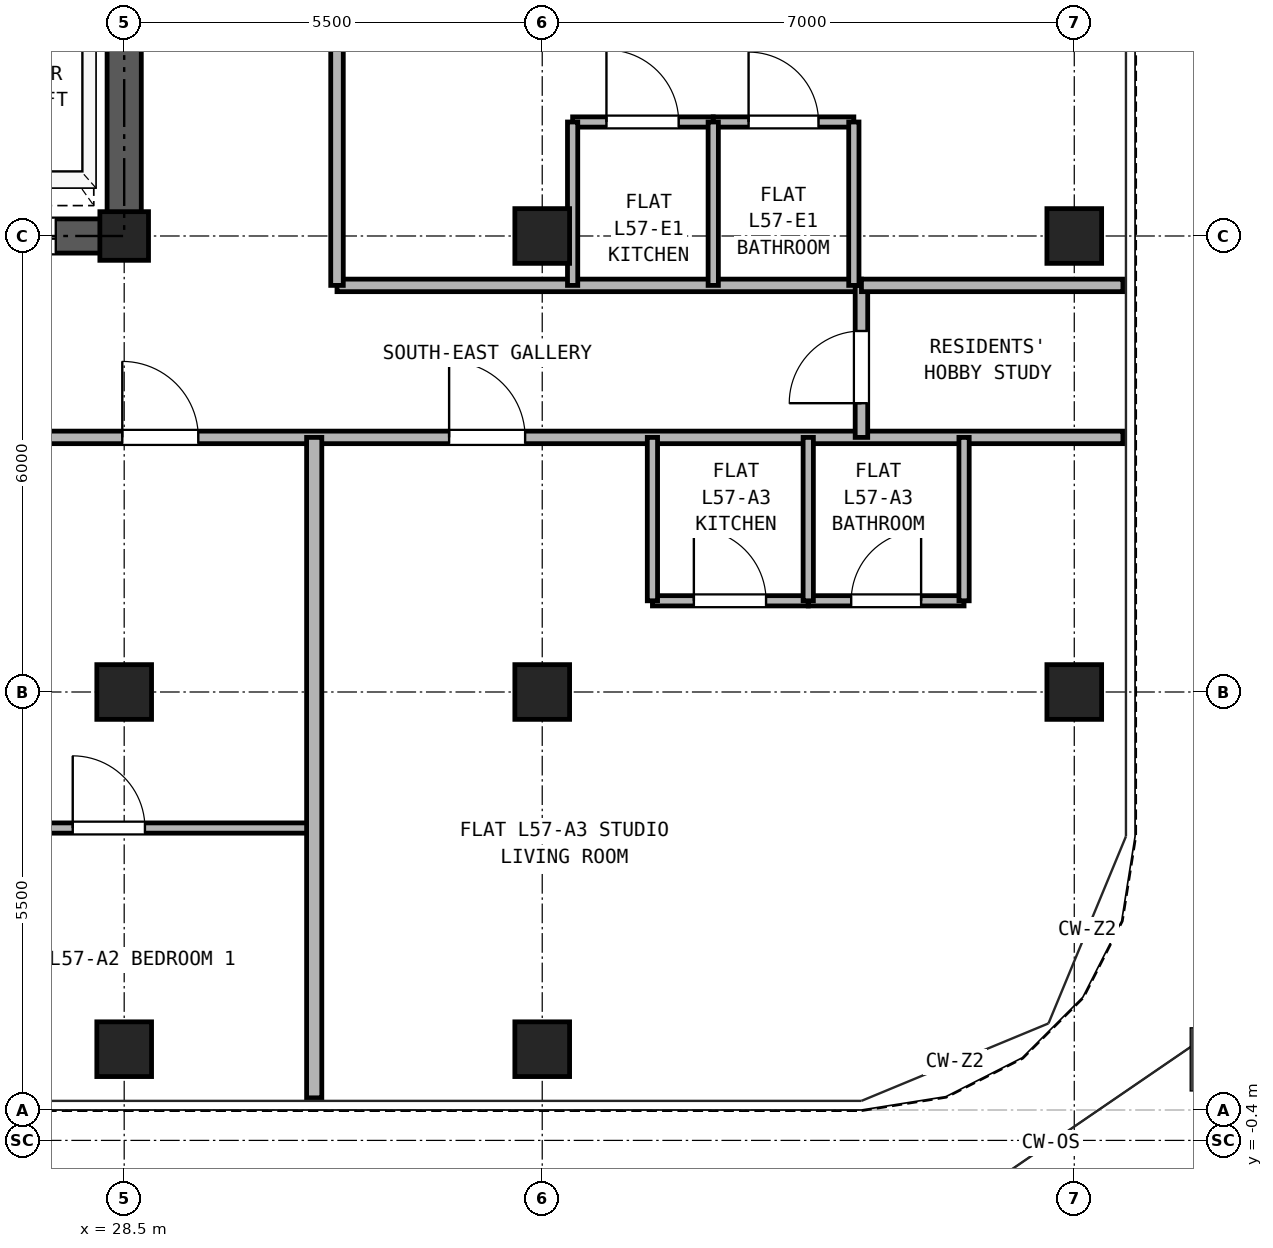
"""IFC4 building model, lengths in metres.
Left out: names, types, materials, properties, quantities, classifications, styles, units other than length and angle.
Written with IfcOpenShell. Run it as: python <this file> out.ifc"""

import sys

from ifc_helpers import new_model, si_unit, direction, frame, frame_2d, origin, origin_2d, place, context, subcontext, project, spatial, rectangle, hollow_rectangle, extrude, source, transform, mapped, element, fill, save


model = new_model("IFC4")
c1 = context("Model", 3, precision=1e-05, world=origin(), true_north=direction((0.0, 1.0)))
c2 = subcontext(c1, "Body", "Model", "MODEL_VIEW")
j1 = project(units=[si_unit("LENGTHUNIT", "METRE"), si_unit("PLANEANGLEUNIT", "RADIAN")], contexts=[c1])
p1 = place(None, origin())
s1 = spatial("IfcSite", under=j1, at=p1, CompositionType="ELEMENT")
p2 = place(p1, origin())
s2 = spatial("IfcBuilding", under=s1, at=p2, CompositionType="ELEMENT")
p3 = place(p2, frame((0.0, 0.0, 202.8)))
s3 = spatial("IfcBuildingStorey", under=s2, at=p3, CompositionType="ELEMENT", Elevation=202.8)
m1 = source(origin(), c2, "Body", "SweptSolid", [
    extrude(hollow_rectangle(XDim=0.72, YDim=0.72, WallThickness=0.04, at=origin_2d()), origin(), (0.0, 0.0, 1.0), 2.95),
])
for number, where, z_axis, x_axis in (
    (1, (28.5, 0.8, 0.0), (0.0, 0.0, 1.0), (1.0, 0.0, 0.0)),
    (2, (34.0, 0.8, 0.0), (0.0, 0.0, 1.0), (1.0, 0.0, 0.0)),
    (3, (41.0, 5.5, 0.0), (0.0, 0.0, 1.0), (1.0, 0.0, 0.0)),
    (4, (41.0, 11.5, 0.0), (0.0, 0.0, 1.0), (1.0, 0.0, 0.0)),
    (5, (28.5, 5.5, 0.0), (0.0, 0.0, 1.0), (1.0, 0.0, 0.0)),
):
    element("IfcColumn", number, at=place(p3, frame(where, z_axis=z_axis, x_axis=x_axis)), inside=s3, PredefinedType="COLUMN", context=c2, shape_type="MappedRepresentation", body=[
        mapped(m1, transform((0.0, 0.0, 0.0), x_axis=(1.0, 0.0, 0.0), y_axis=(0.0, 1.0, 0.0), z_axis=(0.0, 0.0, 1.0), scale=1.0)),
    ])
m2 = source(origin(), c2, "Body", "SweptSolid", [
    extrude(hollow_rectangle(XDim=0.64, YDim=0.64, WallThickness=0.035, at=origin_2d()), origin(), (0.0, 0.0, 1.0), 2.95),
])
p4 = place(p3, frame((28.5, 11.5, 0.0), z_axis=(0.0, 0.0, 1.0), x_axis=(1.0, 0.0, 0.0)))
e6 = element("IfcColumn", 6, at=p4, inside=s3, PredefinedType="COLUMN", context=c2, shape_type="MappedRepresentation", body=[
    mapped(m2, transform((0.0, 0.0, 0.0), x_axis=(1.0, 0.0, 0.0), y_axis=(0.0, 1.0, 0.0), z_axis=(0.0, 0.0, 1.0), scale=1.0)),
])
for number, where, z_axis, x_axis in (
    (7, (34.0, 5.5, 0.0), (0.0, 0.0, 1.0), (1.0, 0.0, 0.0)),
    (8, (34.0, 11.5, 0.0), (0.0, 0.0, 1.0), (1.0, 0.0, 0.0)),
):
    element("IfcColumn", number, at=place(p3, frame(where, z_axis=z_axis, x_axis=x_axis)), inside=s3, PredefinedType="COLUMN", context=c2, shape_type="MappedRepresentation", body=[
        mapped(m1, transform((0.0, 0.0, 0.0), x_axis=(1.0, 0.0, 0.0), y_axis=(0.0, 1.0, 0.0), z_axis=(0.0, 0.0, 1.0), scale=1.0)),
    ])
p5 = place(p3, frame((18.275, 11.5, 0.0), z_axis=(0.0, 0.0, 1.0), x_axis=(1.0, 0.0, 0.0)))
e9 = element("IfcWall", 9, at=p5, inside=s3, PredefinedType="SHEAR", context=c2, shape_type="SweptSolid", body=[
    extrude(rectangle(XDim=10.45, YDim=0.45, at=frame_2d((5.225, 0.0))), origin(), (0.0, 0.0, 1.0), 2.95),
])
p6 = place(p5, frame((1.825, 0.0, 0.0)))
e10 = element("IfcOpeningElement", 10, at=p6, cuts=e9, PredefinedType="OPENING", context=c2, shape_type="SweptSolid", body=[
    extrude(rectangle(XDim=0.95, YDim=2.15, at=frame_2d((0.475, 1.075))), frame((0.0, 0.235, 0.0), z_axis=(0.0, -1.0, 0.0), x_axis=(1.0, 0.0, 0.0)), (0.0, 0.0, 1.0), 0.47),
])
p7 = place(p5, frame((5.325, 0.0, 0.0)))
e11 = element("IfcOpeningElement", 11, at=p7, cuts=e9, PredefinedType="OPENING", context=c2, shape_type="SweptSolid", body=[
    extrude(rectangle(XDim=0.95, YDim=2.15, at=frame_2d((0.475, 1.075))), frame((0.0, 0.235, 0.0), z_axis=(0.0, -1.0, 0.0), x_axis=(1.0, 0.0, 0.0)), (0.0, 0.0, 1.0), 0.47),
])
p8 = place(p5, frame((8.225, 0.0, 0.0)))
e12 = element("IfcOpeningElement", 12, at=p8, cuts=e9, PredefinedType="OPENING", context=c2, shape_type="SweptSolid", body=[
    extrude(rectangle(XDim=1.1, YDim=2.25, at=frame_2d((0.55, 1.125))), frame((0.0, 0.235, 0.0), z_axis=(0.0, -1.0, 0.0), x_axis=(1.0, 0.0, 0.0)), (0.0, 0.0, 1.0), 0.47),
])
p9 = place(p3, frame((28.5, 11.725, 0.0), z_axis=(0.0, 0.0, 1.0), x_axis=(0.0, 1.0, 0.0)))
e13 = element("IfcWall", 13, at=p9, inside=s3, PredefinedType="SHEAR", context=c2, shape_type="SweptSolid", body=[
    extrude(rectangle(XDim=16.8, YDim=0.45, at=frame_2d((8.4, 0.0))), origin(), (0.0, 0.0, 1.0), 2.95),
])
p10 = place(p9, frame((7.425, 0.0, 0.0)))
e14 = element("IfcOpeningElement", 14, at=p10, cuts=e13, PredefinedType="OPENING", context=c2, shape_type="SweptSolid", body=[
    extrude(rectangle(XDim=1.15, YDim=2.2, at=frame_2d((0.575, 1.1))), frame((0.0, 0.235, 0.0), z_axis=(0.0, -1.0, 0.0), x_axis=(1.0, 0.0, 0.0)), (0.0, 0.0, 1.0), 0.47),
])
p11 = place(p3, frame((0.16, 8.85, 0.0), z_axis=(0.0, 0.0, 1.0), x_axis=(1.0, 0.0, 0.0)))
e15 = element("IfcWall", 15, at=p11, inside=s3, PredefinedType="PARTITIONING", context=c2, shape_type="SweptSolid", body=[
    extrude(rectangle(XDim=41.48, YDim=0.165, at=frame_2d((20.74, 0.0))), origin(), (0.0, 0.0, 1.0), 2.95),
])
p12 = place(p11, frame((14.815, 0.0, 0.0)))
e16 = element("IfcOpeningElement", 16, at=p12, cuts=e15, PredefinedType="OPENING", context=c2, shape_type="SweptSolid", body=[
    extrude(rectangle(XDim=1.0, YDim=2.15, at=frame_2d((0.5, 1.075))), frame((0.0, 0.093, 0.0), z_axis=(0.0, -1.0, 0.0), x_axis=(1.0, 0.0, 0.0)), (0.0, 0.0, 1.0), 0.185),
])
p13 = place(p11, frame((28.315, 0.0, 0.0)))
e17 = element("IfcOpeningElement", 17, at=p13, cuts=e15, PredefinedType="OPENING", context=c2, shape_type="SweptSolid", body=[
    extrude(rectangle(XDim=1.0, YDim=2.15, at=frame_2d((0.5, 1.075))), frame((0.0, 0.093, 0.0), z_axis=(0.0, -1.0, 0.0), x_axis=(1.0, 0.0, 0.0)), (0.0, 0.0, 1.0), 0.185),
])
p14 = place(p11, frame((32.615, 0.0, 0.0)))
e18 = element("IfcOpeningElement", 18, at=p14, cuts=e15, PredefinedType="OPENING", context=c2, shape_type="SweptSolid", body=[
    extrude(rectangle(XDim=1.0, YDim=2.15, at=frame_2d((0.5, 1.075))), frame((0.0, 0.093, 0.0), z_axis=(0.0, -1.0, 0.0), x_axis=(1.0, 0.0, 0.0)), (0.0, 0.0, 1.0), 0.185),
])
p15 = place(p3, frame((31.3, 10.85, 0.0), z_axis=(0.0, 0.0, 1.0), x_axis=(1.0, 0.0, 0.0)))
e19 = element("IfcWall", 19, at=p15, inside=s3, PredefinedType="PARTITIONING", context=c2, shape_type="SweptSolid", body=[
    extrude(rectangle(XDim=6.9, YDim=0.165, at=frame_2d((3.45, 0.0))), origin(), (0.0, 0.0, 1.0), 2.95),
])
p16 = place(p3, frame((38.2, 8.85, 0.0), z_axis=(0.0, 0.0, 1.0), x_axis=(0.0, 1.0, 0.0)))
e20 = element("IfcWall", 20, at=p16, inside=s3, PredefinedType="PARTITIONING", context=c2, shape_type="SweptSolid", body=[
    extrude(rectangle(XDim=2.0, YDim=0.165, at=frame_2d((1.0, 0.0))), origin(), (0.0, 0.0, 1.0), 2.95),
])
p17 = place(p16, frame((0.45, 0.0, 0.0)))
e21 = element("IfcOpeningElement", 21, at=p17, cuts=e20, PredefinedType="OPENING", context=c2, shape_type="SweptSolid", body=[
    extrude(rectangle(XDim=0.95, YDim=2.15, at=frame_2d((0.475, 1.075))), frame((0.0, 0.093, 0.0), z_axis=(0.0, -1.0, 0.0), x_axis=(1.0, 0.0, 0.0)), (0.0, 0.0, 1.0), 0.185),
])
p18 = place(p3, frame((31.3, 10.85, 0.0), z_axis=(0.0, 0.0, 1.0), x_axis=(0.0, 1.0, 0.0)))
e22 = element("IfcWall", 22, at=p18, inside=s3, PredefinedType="PARTITIONING", context=c2, shape_type="SweptSolid", body=[
    extrude(rectangle(XDim=24.29, YDim=0.165, at=frame_2d((12.145, 0.0))), origin(), (0.0, 0.0, 1.0), 2.95),
])
p19 = place(p18, frame((3.675, 0.0, 0.0)))
e23 = element("IfcOpeningElement", 23, at=p19, cuts=e22, PredefinedType="OPENING", context=c2, shape_type="SweptSolid", body=[
    extrude(rectangle(XDim=1.0, YDim=2.15, at=frame_2d((0.5, 1.075))), frame((0.0, 0.093, 0.0), z_axis=(0.0, -1.0, 0.0), x_axis=(1.0, 0.0, 0.0)), (0.0, 0.0, 1.0), 0.185),
])
p20 = place(p18, frame((11.95, 0.0, 0.0)))
e24 = element("IfcOpeningElement", 24, at=p20, cuts=e22, PredefinedType="OPENING", context=c2, shape_type="SweptSolid", body=[
    extrude(rectangle(XDim=1.0, YDim=2.15, at=frame_2d((0.5, 1.075))), frame((0.0, 0.093, 0.0), z_axis=(0.0, -1.0, 0.0), x_axis=(1.0, 0.0, 0.0)), (0.0, 0.0, 1.0), 0.185),
])
p21 = place(p18, frame((17.75, 0.0, 0.0)))
e25 = element("IfcOpeningElement", 25, at=p21, cuts=e22, PredefinedType="OPENING", context=c2, shape_type="SweptSolid", body=[
    extrude(rectangle(XDim=1.0, YDim=2.15, at=frame_2d((0.5, 1.075))), frame((0.0, 0.093, 0.0), z_axis=(0.0, -1.0, 0.0), x_axis=(1.0, 0.0, 0.0)), (0.0, 0.0, 1.0), 0.185),
])
p22 = place(p3, frame((25.606, 3.71, 0.0), z_axis=(0.0, 0.0, 1.0), x_axis=(1.0, 0.0, 0.0)))
e26 = element("IfcWall", 26, at=p22, inside=s3, PredefinedType="PARTITIONING", context=c2, shape_type="SweptSolid", body=[
    extrude(rectangle(XDim=5.394, YDim=0.135, at=frame_2d((2.697, 0.0))), origin(), (0.0, 0.0, 1.0), 2.95),
])
p23 = place(p22, frame((2.217, 0.0, 0.0)))
e27 = element("IfcOpeningElement", 27, at=p23, cuts=e26, PredefinedType="OPENING", context=c2, shape_type="SweptSolid", body=[
    extrude(rectangle(XDim=0.95, YDim=2.15, at=frame_2d((0.475, 1.075))), frame((0.0, 0.077, 0.0), z_axis=(0.0, -1.0, 0.0), x_axis=(1.0, 0.0, 0.0)), (0.0, 0.0, 1.0), 0.155),
])
p24 = place(p3, frame((31.0, 0.16, 0.0), z_axis=(0.0, 0.0, 1.0), x_axis=(0.0, 1.0, 0.0)))
e28 = element("IfcWall", 28, at=p24, inside=s3, PredefinedType="PARTITIONING", context=c2, shape_type="SweptSolid", body=[
    extrude(rectangle(XDim=8.69, YDim=0.2, at=frame_2d((4.345, 0.0))), origin(), (0.0, 0.0, 1.0), 2.95),
])
p25 = place(p3, frame((35.45, 6.7, 0.0), z_axis=(0.0, 0.0, 1.0), x_axis=(1.0, 0.0, 0.0)))
e29 = element("IfcWall", 29, at=p25, inside=s3, PredefinedType="PARTITIONING", context=c2, shape_type="SweptSolid", body=[
    extrude(rectangle(XDim=2.05, YDim=0.135, at=frame_2d((1.025, 0.0))), origin(), (0.0, 0.0, 1.0), 2.95),
])
p26 = place(p25, frame((0.545, 0.0, 0.0)))
e30 = element("IfcOpeningElement", 30, at=p26, cuts=e29, PredefinedType="OPENING", context=c2, shape_type="SweptSolid", body=[
    extrude(rectangle(XDim=0.95, YDim=2.15, at=frame_2d((0.475, 1.075))), frame((0.0, 0.077, 0.0), z_axis=(0.0, -1.0, 0.0), x_axis=(1.0, 0.0, 0.0)), (0.0, 0.0, 1.0), 0.155),
])
p27 = place(p3, frame((37.5, 6.7, 0.0), z_axis=(0.0, 0.0, 1.0), x_axis=(1.0, 0.0, 0.0)))
e31 = element("IfcWall", 31, at=p27, inside=s3, PredefinedType="PARTITIONING", context=c2, shape_type="SweptSolid", body=[
    extrude(rectangle(XDim=2.05, YDim=0.135, at=frame_2d((1.025, 0.0))), origin(), (0.0, 0.0, 1.0), 2.95),
])
p28 = place(p27, frame((0.565, 0.0, 0.0)))
e32 = element("IfcOpeningElement", 32, at=p28, cuts=e31, PredefinedType="OPENING", context=c2, shape_type="SweptSolid", body=[
    extrude(rectangle(XDim=0.92, YDim=2.1, at=frame_2d((0.46, 1.05))), frame((0.0, 0.077, 0.0), z_axis=(0.0, -1.0, 0.0), x_axis=(1.0, 0.0, 0.0)), (0.0, 0.0, 1.0), 0.155),
])
for number, where, z_axis, x_axis in (
    (33, (35.45, 6.7, 0.0), (0.0, 0.0, 1.0), (0.0, 1.0, 0.0)),
    (34, (37.5, 6.7, 0.0), (0.0, 0.0, 1.0), (0.0, 1.0, 0.0)),
    (35, (39.55, 6.7, 0.0), (0.0, 0.0, 1.0), (0.0, 1.0, 0.0)),
):
    element("IfcWall", number, at=place(p3, frame(where, z_axis=z_axis, x_axis=x_axis)), inside=s3, PredefinedType="PARTITIONING", context=c2, shape_type="SweptSolid", body=[
        extrude(rectangle(XDim=2.15, YDim=0.135, at=frame_2d((1.075, 0.0))), origin(), (0.0, 0.0, 1.0), 2.95),
    ])
p29 = place(p3, frame((38.2, 10.85, 0.0), z_axis=(0.0, 0.0, 1.0), x_axis=(1.0, 0.0, 0.0)))
e36 = element("IfcWall", 36, at=p29, inside=s3, PredefinedType="PARTITIONING", context=c2, shape_type="SweptSolid", body=[
    extrude(rectangle(XDim=3.44, YDim=0.165, at=frame_2d((1.72, 0.0))), origin(), (0.0, 0.0, 1.0), 2.95),
])
p30 = place(p3, frame((34.4, 13.0, 0.0), z_axis=(0.0, 0.0, 1.0), x_axis=(1.0, 0.0, 0.0)))
e37 = element("IfcWall", 37, at=p30, inside=s3, PredefinedType="PARTITIONING", context=c2, shape_type="SweptSolid", body=[
    extrude(rectangle(XDim=1.85, YDim=0.135, at=frame_2d((0.925, 0.0))), origin(), (0.0, 0.0, 1.0), 2.95),
])
p31 = place(p30, frame((0.445, 0.0, 0.0)))
e38 = element("IfcOpeningElement", 38, at=p31, cuts=e37, PredefinedType="OPENING", context=c2, shape_type="SweptSolid", body=[
    extrude(rectangle(XDim=0.95, YDim=2.15, at=frame_2d((0.475, 1.075))), frame((0.0, 0.077, 0.0), z_axis=(0.0, -1.0, 0.0), x_axis=(1.0, 0.0, 0.0)), (0.0, 0.0, 1.0), 0.155),
])
p32 = place(p3, frame((36.25, 13.0, 0.0), z_axis=(0.0, 0.0, 1.0), x_axis=(1.0, 0.0, 0.0)))
e39 = element("IfcWall", 39, at=p32, inside=s3, PredefinedType="PARTITIONING", context=c2, shape_type="SweptSolid", body=[
    extrude(rectangle(XDim=1.85, YDim=0.135, at=frame_2d((0.925, 0.0))), origin(), (0.0, 0.0, 1.0), 2.95),
])
p33 = place(p32, frame((0.465, 0.0, 0.0)))
e40 = element("IfcOpeningElement", 40, at=p33, cuts=e39, PredefinedType="OPENING", context=c2, shape_type="SweptSolid", body=[
    extrude(rectangle(XDim=0.92, YDim=2.1, at=frame_2d((0.46, 1.05))), frame((0.0, 0.077, 0.0), z_axis=(0.0, -1.0, 0.0), x_axis=(1.0, 0.0, 0.0)), (0.0, 0.0, 1.0), 0.155),
])
for number, where, z_axis, x_axis in (
    (41, (34.4, 10.85, 0.0), (0.0, 0.0, 1.0), (0.0, 1.0, 0.0)),
    (42, (36.25, 10.85, 0.0), (0.0, 0.0, 1.0), (0.0, 1.0, 0.0)),
    (43, (38.1, 10.85, 0.0), (0.0, 0.0, 1.0), (0.0, 1.0, 0.0)),
):
    element("IfcWall", number, at=place(p3, frame(where, z_axis=z_axis, x_axis=x_axis)), inside=s3, PredefinedType="PARTITIONING", context=c2, shape_type="SweptSolid", body=[
        extrude(rectangle(XDim=2.15, YDim=0.135, at=frame_2d((1.075, 0.0))), origin(), (0.0, 0.0, 1.0), 2.95),
    ])
p34 = place(p8, frame((1.1, 0.0, 0.0), z_axis=(0.0, 0.0, 1.0), x_axis=(-1.0, 0.0, 0.0)))
e44 = element("IfcDoor", 44, at=p34, inside=s3, OperationType="DOUBLE_DOOR_SLIDING", PredefinedType="DOOR", context=c2, shape_type="SweptSolid", body=[
    extrude(rectangle(XDim=1.1, YDim=2.25, at=frame_2d((0.55, 1.125))), frame((0.0, 0.025, 0.0), z_axis=(0.0, -1.0, 0.0), x_axis=(1.0, 0.0, 0.0)), (0.0, 0.0, 1.0), 0.05),
])
fill(e12, e44)
p35 = place(p23, frame((0.95, 0.0, 0.0), z_axis=(0.0, 0.0, 1.0), x_axis=(-1.0, 0.0, 0.0)))
e45 = element("IfcDoor", 45, at=p35, inside=s3, OperationType="SINGLE_SWING_LEFT", PredefinedType="DOOR", context=c2, shape_type="SweptSolid", body=[
    extrude(rectangle(XDim=0.95, YDim=2.15, at=frame_2d((0.475, 1.075))), frame((0.0, 0.025, 0.0), z_axis=(0.0, -1.0, 0.0), x_axis=(1.0, 0.0, 0.0)), (0.0, 0.0, 1.0), 0.05),
])
fill(e27, e45)
p36 = place(p13, frame((1.0, 0.0, 0.0), z_axis=(0.0, 0.0, 1.0), x_axis=(-1.0, 0.0, 0.0)))
e46 = element("IfcDoor", 46, at=p36, inside=s3, OperationType="SINGLE_SWING_LEFT", PredefinedType="DOOR", context=c2, shape_type="SweptSolid", body=[
    extrude(rectangle(XDim=1.0, YDim=2.15, at=frame_2d((0.5, 1.075))), frame((0.0, 0.025, 0.0), z_axis=(0.0, -1.0, 0.0), x_axis=(1.0, 0.0, 0.0)), (0.0, 0.0, 1.0), 0.05),
])
fill(e17, e46)
p37 = place(p26, origin())
e47 = element("IfcDoor", 47, at=p37, inside=s3, OperationType="SINGLE_SWING_LEFT", PredefinedType="DOOR", context=c2, shape_type="SweptSolid", body=[
    extrude(rectangle(XDim=0.95, YDim=2.15, at=frame_2d((0.475, 1.075))), frame((0.0, 0.025, 0.0), z_axis=(0.0, -1.0, 0.0), x_axis=(1.0, 0.0, 0.0)), (0.0, 0.0, 1.0), 0.05),
])
fill(e30, e47)
p38 = place(p28, origin())
e48 = element("IfcDoor", 48, at=p38, inside=s3, OperationType="SINGLE_SWING_RIGHT", PredefinedType="DOOR", context=c2, shape_type="SweptSolid", body=[
    extrude(rectangle(XDim=0.92, YDim=2.1, at=frame_2d((0.46, 1.05))), frame((0.0, 0.025, 0.0), z_axis=(0.0, -1.0, 0.0), x_axis=(1.0, 0.0, 0.0)), (0.0, 0.0, 1.0), 0.05),
])
fill(e32, e48)
p39 = place(p14, frame((1.0, 0.0, 0.0), z_axis=(0.0, 0.0, 1.0), x_axis=(-1.0, 0.0, 0.0)))
e49 = element("IfcDoor", 49, at=p39, inside=s3, OperationType="SINGLE_SWING_LEFT", PredefinedType="DOOR", context=c2, shape_type="SweptSolid", body=[
    extrude(rectangle(XDim=1.0, YDim=2.15, at=frame_2d((0.5, 1.075))), frame((0.0, 0.025, 0.0), z_axis=(0.0, -1.0, 0.0), x_axis=(1.0, 0.0, 0.0)), (0.0, 0.0, 1.0), 0.05),
])
fill(e18, e49)
p40 = place(p17, origin())
e50 = element("IfcDoor", 50, at=p40, inside=s3, OperationType="SINGLE_SWING_LEFT", PredefinedType="DOOR", context=c2, shape_type="SweptSolid", body=[
    extrude(rectangle(XDim=0.95, YDim=2.15, at=frame_2d((0.475, 1.075))), frame((0.0, 0.025, 0.0), z_axis=(0.0, -1.0, 0.0), x_axis=(1.0, 0.0, 0.0)), (0.0, 0.0, 1.0), 0.05),
])
fill(e21, e50)
p41 = place(p31, origin())
e51 = element("IfcDoor", 51, at=p41, inside=s3, OperationType="SINGLE_SWING_LEFT", PredefinedType="DOOR", context=c2, shape_type="SweptSolid", body=[
    extrude(rectangle(XDim=0.95, YDim=2.15, at=frame_2d((0.475, 1.075))), frame((0.0, 0.025, 0.0), z_axis=(0.0, -1.0, 0.0), x_axis=(1.0, 0.0, 0.0)), (0.0, 0.0, 1.0), 0.05),
])
fill(e38, e51)
p42 = place(p33, origin())
e52 = element("IfcDoor", 52, at=p42, inside=s3, OperationType="SINGLE_SWING_LEFT", PredefinedType="DOOR", context=c2, shape_type="SweptSolid", body=[
    extrude(rectangle(XDim=0.92, YDim=2.1, at=frame_2d((0.46, 1.05))), frame((0.0, 0.025, 0.0), z_axis=(0.0, -1.0, 0.0), x_axis=(1.0, 0.0, 0.0)), (0.0, 0.0, 1.0), 0.05),
])
fill(e40, e52)
save(model, sys.argv[1])
